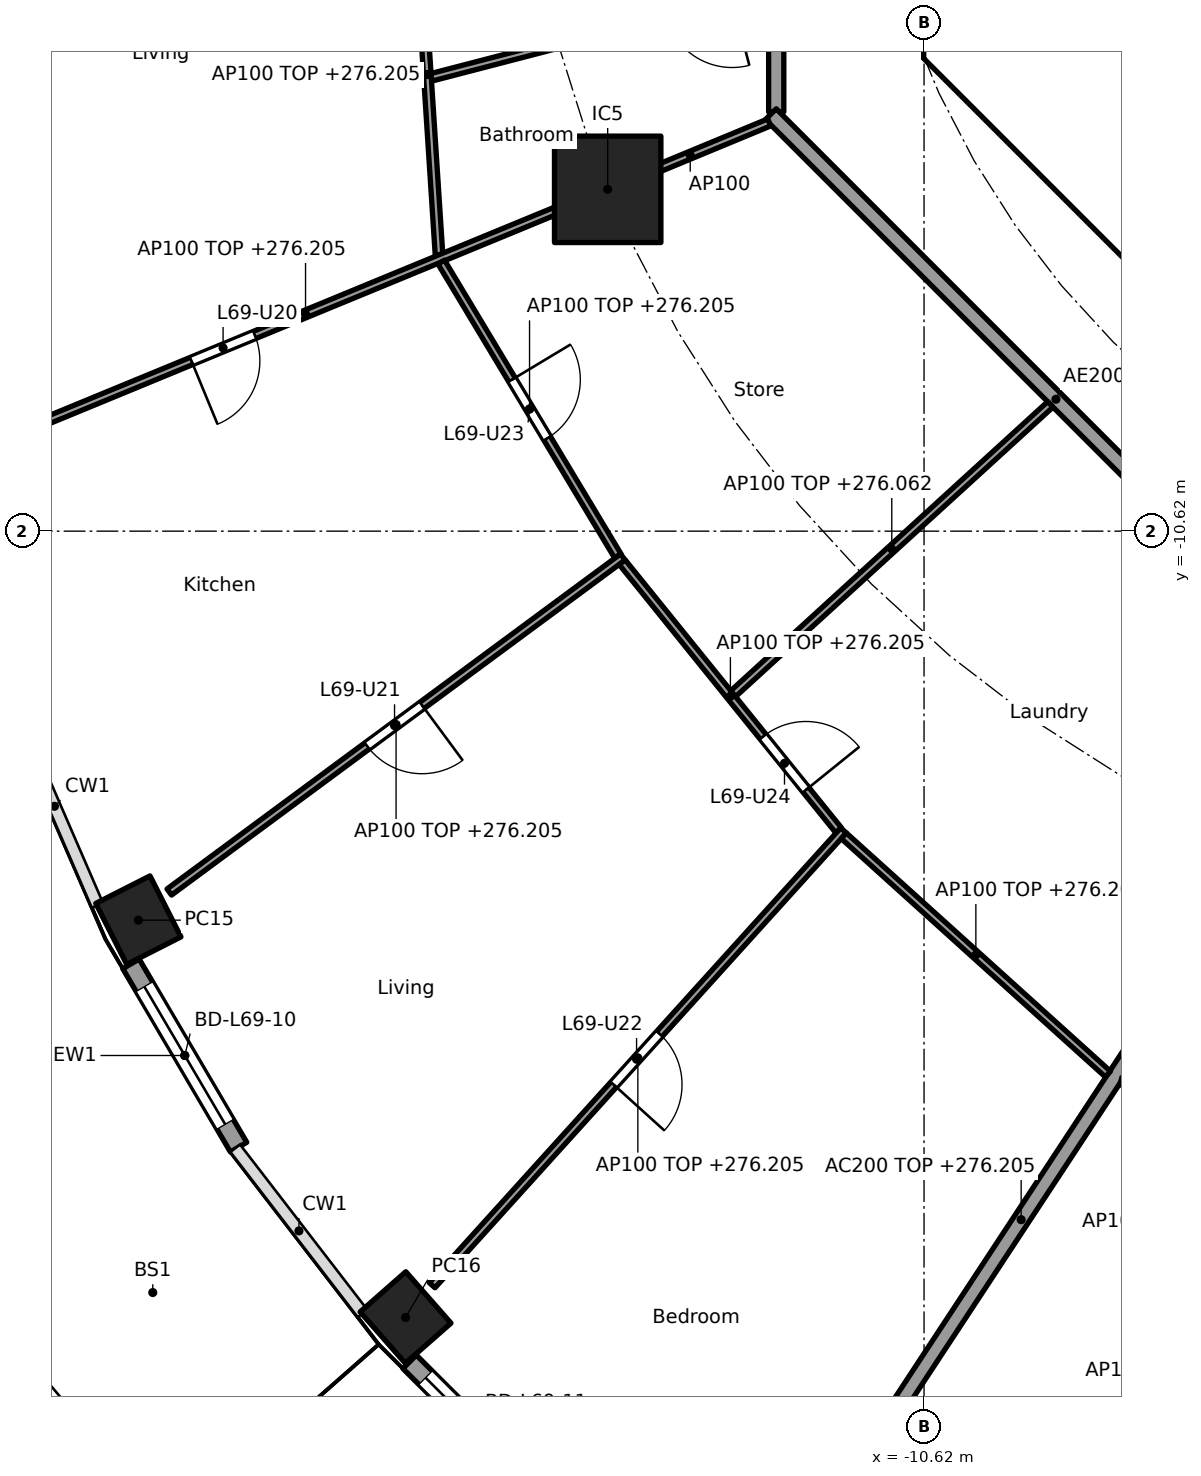
"""IFC4 building model, lengths in metres.
Left out: names, types, materials, properties, quantities, classifications, styles, units other than length and angle.
Written with IfcOpenShell. Run it as: python <this file> out.ifc"""

import sys

from ifc_helpers import new_model, si_unit, direction, frame, frame_2d, origin, origin_2d, place, context, subcontext, project, spatial, polyline, rectangle, hollow_rectangle, outline, extrude, element, fill, save


model = new_model("IFC4")
c1 = context("Model", 3, precision=1e-05, world=origin(), true_north=direction((0.0, 1.0)))
c2 = subcontext(c1, "Body", "Model", "MODEL_VIEW")
j1 = project(units=[si_unit("LENGTHUNIT", "METRE"), si_unit("PLANEANGLEUNIT", "RADIAN")], contexts=[c1])
p1 = place(None, origin())
s1 = spatial("IfcSite", under=j1, at=p1, CompositionType="ELEMENT")
p2 = place(p1, origin())
s2 = spatial("IfcBuilding", under=s1, at=p2, CompositionType="ELEMENT")
p3 = place(p2, frame((0.0, 0.0, 273.3)))
s3 = spatial("IfcBuildingStorey", under=s2, at=p3, CompositionType="ELEMENT", Elevation=273.3)
for number, where, z_axis, x_axis in (
    (1, (-20.957, -15.738, 0.0), (0.0, 0.0, 1.0), (0.452, -0.892, 0.0)),
    (2, (-17.441, -20.965, 0.0), (0.0, 0.0, 1.0), (0.66, -0.751, 0.0)),
):
    element("IfcColumn", number, at=place(p3, frame(where, z_axis=z_axis, x_axis=x_axis)), inside=s3, PredefinedType="COLUMN", context=c2, shape_type="SweptSolid", body=[
        extrude(hollow_rectangle(XDim=0.9, YDim=0.8, WallThickness=0.028, at=origin_2d()), origin(), (0.0, 0.0, 1.0), 3.7),
    ])
p4 = place(p3, frame((-14.782, -6.123, 0.0), z_axis=(0.0, 0.0, 1.0), x_axis=(1.0, 0.0, 0.0)))
e3 = element("IfcColumn", 3, at=p4, inside=s3, PredefinedType="COLUMN", context=c2, shape_type="SweptSolid", body=[
    extrude(rectangle(XDim=1.4, YDim=1.4, at=origin_2d()), origin(), (0.0, 0.0, 1.0), 3.7),
])
p5 = place(p3, frame((-19.638, -18.724, 0.0), z_axis=(0.0, 0.0, 1.0), x_axis=(-0.506371364425, 0.862315511452, 0.0)))
e4 = element("IfcWall", 4, at=p5, inside=s3, PredefinedType="SOLIDWALL", context=c2, shape_type="SweptSolid", body=[
    extrude(rectangle(XDim=2.796, YDim=0.25, at=frame_2d((1.398, 0.0))), origin(), (0.0, 0.0, 1.0), 3.44),
])
p6 = place(p5, frame((0.348, 0.0, 0.0)))
e5 = element("IfcOpeningElement", 5, at=p6, cuts=e4, PredefinedType="OPENING", context=c2, shape_type="SweptSolid", body=[
    extrude(rectangle(XDim=2.1, YDim=2.4, at=frame_2d((1.05, 1.2))), frame((0.0, 0.135, 0.0), z_axis=(0.0, -1.0, 0.0), x_axis=(1.0, 0.0, 0.0)), (0.0, 0.0, 1.0), 0.27),
])
p7 = place(p3, frame((-15.482, -23.45, 0.0), z_axis=(0.0, 0.0, 1.0), x_axis=(-0.707831739508, 0.706381078841, 0.0)))
e6 = element("IfcWall", 6, at=p7, inside=s3, PredefinedType="SOLIDWALL", context=c2, shape_type="SweptSolid", body=[
    extrude(rectangle(XDim=2.693, YDim=0.25, at=frame_2d((1.346, 0.0))), origin(), (0.0, 0.0, 1.0), 3.44),
])
p8 = place(p7, frame((0.296, 0.0, 0.0)))
e7 = element("IfcOpeningElement", 7, at=p8, cuts=e6, PredefinedType="OPENING", context=c2, shape_type="SweptSolid", body=[
    extrude(rectangle(XDim=2.1, YDim=2.4, at=frame_2d((1.05, 1.2))), frame((0.0, 0.135, 0.0), z_axis=(0.0, -1.0, 0.0), x_axis=(1.0, 0.0, 0.0)), (0.0, 0.0, 1.0), 0.27),
])
p9 = place(p3, frame((-9.988, -4.613, 0.0), z_axis=(0.0, 0.0, 1.0), x_axis=(0.707106781187, -0.707106781187, 0.0)))
e8 = element("IfcWall", 8, at=p9, inside=s3, PredefinedType="SHEAR", context=c2, shape_type="SweptSolid", body=[
    extrude(rectangle(XDim=7.602, YDim=0.6, at=frame_2d((3.801, 0.0))), origin(), (0.0, 0.0, 1.0), 3.44),
])
p10 = place(p9, frame((6.151, 0.0, 0.0)))
e9 = element("IfcOpeningElement", 9, at=p10, cuts=e8, PredefinedType="OPENING", context=c2, shape_type="SweptSolid", body=[
    extrude(rectangle(XDim=1.1, YDim=2.1, at=frame_2d((0.55, 1.05))), frame((0.0, 0.31, 0.0), z_axis=(0.0, -1.0, 0.0), x_axis=(1.0, 0.0, 0.0)), (0.0, 0.0, 1.0), 0.62),
])
p11 = place(p3, origin())
e10 = element("IfcWall", 10, at=p11, inside=s3, PredefinedType="SHEAR", context=c2, shape_type="SweptSolid", body=[
    extrude(outline(polyline([(-10.625, -3.801), (-10.025, -3.801), (-10.025, -4.152), (-9.776, -4.401), (-10.2, -4.825), (-10.625, -4.401), (-10.625, -3.801)])), origin(), (0.0, 0.0, 1.0), 3.44),
])
p12 = place(p3, frame((-6.151, -14.824, 0.0), z_axis=(0.0, 0.0, 1.0), x_axis=(-0.549345577828, -0.835595258556, 0.0)))
e11 = element("IfcWall", 11, at=p12, inside=s3, PredefinedType="PARTITIONING", context=c2, shape_type="SweptSolid", body=[
    extrude(rectangle(XDim=11.62, YDim=0.2, at=frame_2d((5.81, 0.0))), origin(), (0.0, 0.0, 1.0), 2.905),
])
p13 = place(p3, frame((-12.565, 5.304, 0.0), z_axis=(0.0, 0.0, 1.0), x_axis=(0.0, -1.0, 0.0)))
e12 = element("IfcWall", 12, at=p13, inside=s3, PredefinedType="PARTITIONING", context=c2, shape_type="SweptSolid", body=[
    extrude(rectangle(XDim=10.409, YDim=0.2, at=frame_2d((5.205, 0.0))), origin(), (0.0, 0.0, 1.0), 3.44),
])
p14 = place(p13, frame((6.539, 0.0, 0.0)))
e13 = element("IfcOpeningElement", 13, at=p14, cuts=e12, PredefinedType="OPENING", context=c2, shape_type="SweptSolid", body=[
    extrude(rectangle(XDim=1.0, YDim=2.1, at=frame_2d((0.5, 1.05))), frame((0.0, 0.11, 0.0), z_axis=(0.0, -1.0, 0.0), x_axis=(1.0, 0.0, 0.0)), (0.0, 0.0, 1.0), 0.22),
])
p15 = place(p3, frame((-12.635, -5.134, 0.0), z_axis=(0.0, 0.0, 1.0), x_axis=(0.707106781187, -0.707106781187, 0.0)))
e14 = element("IfcWall", 14, at=p15, inside=s3, PredefinedType="PARTITIONING", context=c2, shape_type="SweptSolid", body=[
    extrude(rectangle(XDim=10.609, YDim=0.2, at=frame_2d((5.305, 0.0))), origin(), (0.0, 0.0, 1.0), 3.44),
])
p16 = place(p3, frame((-17.31, -2.238, 0.0), z_axis=(0.0, 0.0, 1.0), x_axis=(0.064949202176, -0.997888571503, 0.0)))
e15 = element("IfcWall", 15, at=p16, inside=s3, PredefinedType="PARTITIONING", context=c2, shape_type="SweptSolid", body=[
    extrude(rectangle(XDim=4.759, YDim=0.1, at=frame_2d((2.379, 0.0))), origin(), (0.0, 0.0, 1.0), 2.905),
])
p17 = place(p16, frame((0.79, 0.0, 0.0)))
e16 = element("IfcOpeningElement", 16, at=p17, cuts=e15, PredefinedType="OPENING", context=c2, shape_type="SweptSolid", body=[
    extrude(rectangle(XDim=0.9, YDim=2.1, at=frame_2d((0.45, 1.05))), frame((0.0, 0.06, 0.0), z_axis=(0.0, -1.0, 0.0), x_axis=(1.0, 0.0, 0.0)), (0.0, 0.0, 1.0), 0.12),
])
p18 = place(p3, frame((-12.662, -3.495, 0.0), z_axis=(0.0, 0.0, 1.0), x_axis=(-0.967834941053, -0.251586022817, 0.0)))
e17 = element("IfcWall", 17, at=p18, inside=s3, PredefinedType="PARTITIONING", context=c2, shape_type="SweptSolid", body=[
    extrude(rectangle(XDim=4.59, YDim=0.1, at=frame_2d((2.295, 0.0))), origin(), (0.0, 0.0, 1.0), 2.762),
])
p19 = place(p18, frame((0.5, 0.0, 0.0)))
e18 = element("IfcOpeningElement", 18, at=p19, cuts=e17, PredefinedType="OPENING", context=c2, shape_type="SweptSolid", body=[
    extrude(rectangle(XDim=0.9, YDim=2.1, at=frame_2d((0.45, 1.05))), frame((0.0, 0.06, 0.0), z_axis=(0.0, -1.0, 0.0), x_axis=(1.0, 0.0, 0.0)), (0.0, 0.0, 1.0), 0.12),
])
p20 = place(p3, frame((-12.657, -5.243, 0.0), z_axis=(0.0, 0.0, 1.0), x_axis=(-0.923871314276, -0.382703272338, 0.0)))
e19 = element("IfcWall", 19, at=p20, inside=s3, PredefinedType="PARTITIONING", context=c2, shape_type="SweptSolid", body=[
    extrude(rectangle(XDim=2.249, YDim=0.1, at=frame_2d((1.125, 0.0))), origin(), (0.0, 0.0, 1.0), 3.44),
])
p21 = place(p3, frame((-14.828, -6.142, 0.0), z_axis=(0.0, 0.0, 1.0), x_axis=(-0.924478087429, -0.381235184451, 0.0)))
e20 = element("IfcWall", 20, at=p21, inside=s3, PredefinedType="PARTITIONING", context=c2, shape_type="SweptSolid", body=[
    extrude(rectangle(XDim=8.499, YDim=0.1, at=frame_2d((4.25, 0.0))), origin(), (0.0, 0.0, 1.0), 2.905),
])
p22 = place(p21, frame((4.973, 0.0, 0.0)))
e21 = element("IfcOpeningElement", 21, at=p22, cuts=e20, PredefinedType="OPENING", context=c2, shape_type="SweptSolid", body=[
    extrude(rectangle(XDim=0.9, YDim=2.1, at=frame_2d((0.45, 1.05))), frame((0.0, 0.06, 0.0), z_axis=(0.0, -1.0, 0.0), x_axis=(1.0, 0.0, 0.0)), (0.0, 0.0, 1.0), 0.12),
])
p23 = place(p3, frame((-16.972, -7.08, 0.0), z_axis=(0.0, 0.0, 1.0), x_axis=(0.514989049311, -0.857196756346, 0.0)))
e22 = element("IfcWall", 22, at=p23, inside=s3, PredefinedType="PARTITIONING", context=c2, shape_type="SweptSolid", body=[
    extrude(rectangle(XDim=4.512, YDim=0.1, at=frame_2d((2.256, 0.0))), origin(), (0.0, 0.0, 1.0), 2.905),
])
p24 = place(p23, frame((1.806, 0.0, 0.0)))
e23 = element("IfcOpeningElement", 23, at=p24, cuts=e22, PredefinedType="OPENING", context=c2, shape_type="SweptSolid", body=[
    extrude(rectangle(XDim=0.9, YDim=2.1, at=frame_2d((0.45, 1.05))), frame((0.0, 0.06, 0.0), z_axis=(0.0, -1.0, 0.0), x_axis=(1.0, 0.0, 0.0)), (0.0, 0.0, 1.0), 0.12),
])
p25 = place(p3, frame((-14.582, -10.96, 0.0), z_axis=(0.0, 0.0, 1.0), x_axis=(-0.804405200554, -0.594081032623, 0.0)))
e24 = element("IfcWall", 24, at=p25, inside=s3, PredefinedType="PARTITIONING", context=c2, shape_type="SweptSolid", body=[
    extrude(rectangle(XDim=7.418, YDim=0.1, at=frame_2d((3.709, 0.0))), origin(), (0.0, 0.0, 1.0), 2.905),
])
p26 = place(p25, frame((3.284, 0.0, 0.0)))
e25 = element("IfcOpeningElement", 25, at=p26, cuts=e24, PredefinedType="OPENING", context=c2, shape_type="SweptSolid", body=[
    extrude(rectangle(XDim=0.9, YDim=2.1, at=frame_2d((0.45, 1.05))), frame((0.0, 0.06, 0.0), z_axis=(0.0, -1.0, 0.0), x_axis=(1.0, 0.0, 0.0)), (0.0, 0.0, 1.0), 0.12),
])
p27 = place(p3, frame((-14.591, -11.029, 0.0), z_axis=(0.0, 0.0, 1.0), x_axis=(0.628170338674, -0.778075848237, 0.0)))
e26 = element("IfcWall", 26, at=p27, inside=s3, PredefinedType="PARTITIONING", context=c2, shape_type="SweptSolid", body=[
    extrude(rectangle(XDim=4.532, YDim=0.1, at=frame_2d((2.266, 0.0))), origin(), (0.0, 0.0, 1.0), 2.905),
])
p28 = place(p27, frame((2.949, 0.0, 0.0)))
e27 = element("IfcOpeningElement", 27, at=p28, cuts=e26, PredefinedType="OPENING", context=c2, shape_type="SweptSolid", body=[
    extrude(rectangle(XDim=0.9, YDim=2.1, at=frame_2d((0.45, 1.05))), frame((0.0, 0.06, 0.0), z_axis=(0.0, -1.0, 0.0), x_axis=(1.0, 0.0, 0.0)), (0.0, 0.0, 1.0), 0.12),
])
p29 = place(p3, frame((-8.958, -8.952, 0.0), z_axis=(0.0, 0.0, 1.0), x_axis=(-0.73876526954, -0.673962815385, 0.0)))
e28 = element("IfcWall", 28, at=p29, inside=s3, PredefinedType="PARTITIONING", context=c2, shape_type="SweptSolid", body=[
    extrude(rectangle(XDim=5.647, YDim=0.1, at=frame_2d((2.824, 0.0))), origin(), (0.0, 0.0, 1.0), 2.762),
])
p30 = place(p3, frame((-11.679, -14.557, 0.0), z_axis=(0.0, 0.0, 1.0), x_axis=(-0.670800011545, -0.741638284146, 0.0)))
e29 = element("IfcWall", 29, at=p30, inside=s3, PredefinedType="PARTITIONING", context=c2, shape_type="SweptSolid", body=[
    extrude(rectangle(XDim=8.068, YDim=0.1, at=frame_2d((4.034, 0.0))), origin(), (0.0, 0.0, 1.0), 2.905),
])
p31 = place(p30, frame((3.609, 0.0, 0.0)))
e30 = element("IfcOpeningElement", 30, at=p31, cuts=e29, PredefinedType="OPENING", context=c2, shape_type="SweptSolid", body=[
    extrude(rectangle(XDim=0.9, YDim=2.1, at=frame_2d((0.45, 1.05))), frame((0.0, 0.06, 0.0), z_axis=(0.0, -1.0, 0.0), x_axis=(1.0, 0.0, 0.0)), (0.0, 0.0, 1.0), 0.12),
])
p32 = place(p3, frame((-11.676, -14.628, 0.0), z_axis=(0.0, 0.0, 1.0), x_axis=(0.74245829867, -0.669892285921, 0.0)))
e31 = element("IfcWall", 31, at=p32, inside=s3, PredefinedType="PARTITIONING", context=c2, shape_type="SweptSolid", body=[
    extrude(rectangle(XDim=4.68, YDim=0.1, at=frame_2d((2.34, 0.0))), origin(), (0.0, 0.0, 1.0), 2.905),
])
p33 = place(p3, frame((-8.03, -17.854, 0.0), z_axis=(0.0, 0.0, 1.0), x_axis=(0.968441967324, -0.249239154077, 0.0)))
e32 = element("IfcWall", 32, at=p33, inside=s3, PredefinedType="PARTITIONING", context=c2, shape_type="SweptSolid", body=[
    extrude(rectangle(XDim=3.468, YDim=0.1, at=frame_2d((1.734, 0.0))), origin(), (0.0, 0.0, 1.0), 2.905),
])
p34 = place(p33, frame((1.284, 0.0, 0.0)))
e33 = element("IfcOpeningElement", 33, at=p34, cuts=e32, PredefinedType="OPENING", context=c2, shape_type="SweptSolid", body=[
    extrude(rectangle(XDim=0.9, YDim=2.1, at=frame_2d((0.45, 1.05))), frame((0.0, 0.06, 0.0), z_axis=(0.0, -1.0, 0.0), x_axis=(1.0, 0.0, 0.0)), (0.0, 0.0, 1.0), 0.12),
])
p35 = place(p6, origin())
e34 = element("IfcDoor", 34, at=p35, inside=s3, OperationType="SLIDING_TO_LEFT", PredefinedType="DOOR", context=c2, shape_type="SweptSolid", body=[
    extrude(rectangle(XDim=2.1, YDim=2.4, at=frame_2d((1.05, 1.2))), frame((0.0, 0.025, 0.0), z_axis=(0.0, -1.0, 0.0), x_axis=(1.0, 0.0, 0.0)), (0.0, 0.0, 1.0), 0.05),
])
fill(e5, e34)
p36 = place(p8, origin())
e35 = element("IfcDoor", 35, at=p36, inside=s3, OperationType="SLIDING_TO_LEFT", PredefinedType="DOOR", context=c2, shape_type="SweptSolid", body=[
    extrude(rectangle(XDim=2.1, YDim=2.4, at=frame_2d((1.05, 1.2))), frame((0.0, 0.025, 0.0), z_axis=(0.0, -1.0, 0.0), x_axis=(1.0, 0.0, 0.0)), (0.0, 0.0, 1.0), 0.05),
])
fill(e7, e35)
p37 = place(p22, origin())
e36 = element("IfcDoor", 36, at=p37, inside=s3, OperationType="SINGLE_SWING_RIGHT", PredefinedType="DOOR", context=c2, shape_type="SweptSolid", body=[
    extrude(rectangle(XDim=0.9, YDim=2.1, at=frame_2d((0.45, 1.05))), frame((0.0, 0.025, 0.0), z_axis=(0.0, -1.0, 0.0), x_axis=(1.0, 0.0, 0.0)), (0.0, 0.0, 1.0), 0.05),
])
fill(e21, e36)
p38 = place(p26, origin())
e37 = element("IfcDoor", 37, at=p38, inside=s3, OperationType="SINGLE_SWING_LEFT", PredefinedType="DOOR", context=c2, shape_type="SweptSolid", body=[
    extrude(rectangle(XDim=0.9, YDim=2.1, at=frame_2d((0.45, 1.05))), frame((0.0, 0.025, 0.0), z_axis=(0.0, -1.0, 0.0), x_axis=(1.0, 0.0, 0.0)), (0.0, 0.0, 1.0), 0.05),
])
fill(e25, e37)
p39 = place(p31, origin())
e38 = element("IfcDoor", 38, at=p39, inside=s3, OperationType="SINGLE_SWING_RIGHT", PredefinedType="DOOR", context=c2, shape_type="SweptSolid", body=[
    extrude(rectangle(XDim=0.9, YDim=2.1, at=frame_2d((0.45, 1.05))), frame((0.0, 0.025, 0.0), z_axis=(0.0, -1.0, 0.0), x_axis=(1.0, 0.0, 0.0)), (0.0, 0.0, 1.0), 0.05),
])
fill(e30, e38)
p40 = place(p24, origin())
e39 = element("IfcDoor", 39, at=p40, inside=s3, OperationType="SINGLE_SWING_LEFT", PredefinedType="DOOR", context=c2, shape_type="SweptSolid", body=[
    extrude(rectangle(XDim=0.9, YDim=2.1, at=frame_2d((0.45, 1.05))), frame((0.0, 0.025, 0.0), z_axis=(0.0, -1.0, 0.0), x_axis=(1.0, 0.0, 0.0)), (0.0, 0.0, 1.0), 0.05),
])
fill(e23, e39)
p41 = place(p28, origin())
e40 = element("IfcDoor", 40, at=p41, inside=s3, OperationType="SINGLE_SWING_RIGHT", PredefinedType="DOOR", context=c2, shape_type="SweptSolid", body=[
    extrude(rectangle(XDim=0.9, YDim=2.1, at=frame_2d((0.45, 1.05))), frame((0.0, 0.025, 0.0), z_axis=(0.0, -1.0, 0.0), x_axis=(1.0, 0.0, 0.0)), (0.0, 0.0, 1.0), 0.05),
])
fill(e27, e40)
save(model, sys.argv[1])
